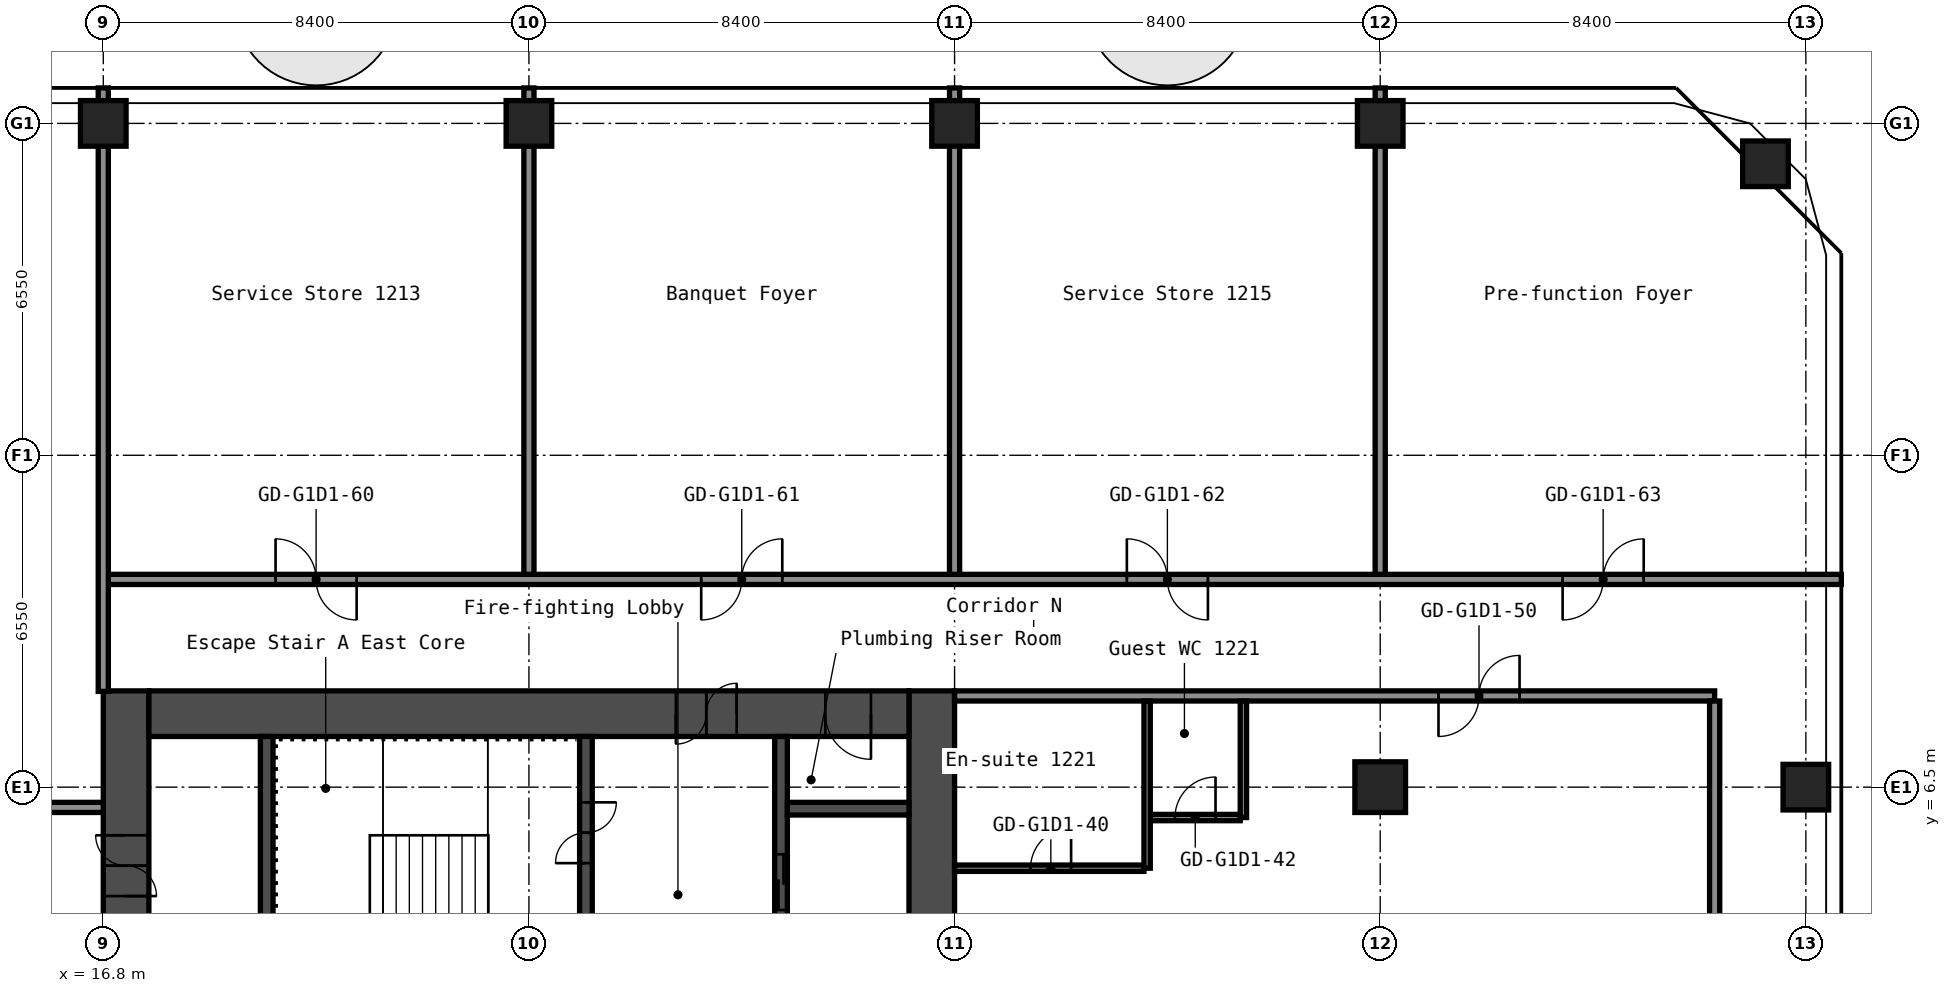
"""IFC4 building model, lengths in metres.
Left out: names, types, materials, properties, quantities, classifications, styles, units other than length and angle.
Written with IfcOpenShell. Run it as: python <this file> out.ifc"""

import sys

from ifc_helpers import new_model, si_unit, direction, frame, frame_2d, origin, origin_2d, place, context, subcontext, project, spatial, rectangle, hollow_rectangle, extrude, element, fill, save


model = new_model("IFC4")
c1 = context("Model", 3, precision=1e-05, world=origin(), true_north=direction((0.0, 1.0)))
c2 = subcontext(c1, "Body", "Model", "MODEL_VIEW")
j1 = project(units=[si_unit("LENGTHUNIT", "METRE"), si_unit("PLANEANGLEUNIT", "RADIAN")], contexts=[c1])
p1 = place(None, origin())
s1 = spatial("IfcSite", under=j1, at=p1, CompositionType="ELEMENT")
p2 = place(p1, origin())
s2 = spatial("IfcBuilding", under=s1, at=p2, CompositionType="ELEMENT")
p3 = place(p2, frame((0.0, 0.0, 45.4)))
s3 = spatial("IfcBuildingStorey", under=s2, at=p3, CompositionType="ELEMENT", Elevation=45.4)
for number, where, z_axis, x_axis in (
    (1, (16.8, 19.6, 0.0), (0.0, 0.0, 1.0), (1.0, 0.0, 0.0)),
    (2, (25.2, 19.6, 0.0), (0.0, 0.0, 1.0), (1.0, 0.0, 0.0)),
    (3, (33.6, 19.6, 0.0), (0.0, 0.0, 1.0), (1.0, 0.0, 0.0)),
):
    element("IfcColumn", number, at=place(p3, frame(where, z_axis=z_axis, x_axis=x_axis)), inside=s3, PredefinedType="COLUMN", context=c2, shape_type="SweptSolid", body=[
        extrude(hollow_rectangle(XDim=0.9, YDim=0.9, WallThickness=0.036, at=origin_2d()), origin(), (0.0, 0.0, 1.0), 2.8),
    ])
p4 = place(p3, frame((42.0, 6.5, 0.0), z_axis=(0.0, 0.0, 1.0), x_axis=(1.0, 0.0, 0.0)))
e4 = element("IfcColumn", 4, at=p4, inside=s3, PredefinedType="COLUMN", context=c2, shape_type="SweptSolid", body=[
    extrude(hollow_rectangle(XDim=1.0, YDim=1.0, WallThickness=0.04, at=origin_2d()), origin(), (0.0, 0.0, 1.0), 2.8),
])
for number, where, z_axis, x_axis in (
    (5, (42.0, 19.6, 0.0), (0.0, 0.0, 1.0), (1.0, 0.0, 0.0)),
    (6, (50.4, 6.5, 0.0), (0.0, 0.0, 1.0), (1.0, 0.0, 0.0)),
    (7, (49.603, 18.803, 0.0), (0.0, 0.0, 1.0), (1.0, 0.0, 0.0)),
):
    element("IfcColumn", number, at=place(p3, frame(where, z_axis=z_axis, x_axis=x_axis)), inside=s3, PredefinedType="COLUMN", context=c2, shape_type="SweptSolid", body=[
        extrude(hollow_rectangle(XDim=0.9, YDim=0.9, WallThickness=0.036, at=origin_2d()), origin(), (0.0, 0.0, 1.0), 2.8),
    ])
p5 = place(p3, frame((17.25, -8.4, 0.0), z_axis=(0.0, 0.0, 1.0), x_axis=(0.0, 1.0, 0.0)))
e8 = element("IfcWall", 8, at=p5, inside=s3, PredefinedType="SHEAR", context=c2, shape_type="SweptSolid", body=[
    extrude(rectangle(XDim=16.8, YDim=0.9, at=frame_2d((8.4, 0.0))), origin(), (0.0, 0.0, 1.0), 2.8),
])
p6 = place(p5, frame((12.75, 0.0, 0.0)))
e9 = element("IfcOpeningElement", 9, at=p6, cuts=e8, PredefinedType="OPENING", context=c2, shape_type="SweptSolid", body=[
    extrude(rectangle(XDim=1.2, YDim=2.1, at=frame_2d((0.6, 1.05))), frame((0.0, 0.46, 0.0), z_axis=(0.0, -1.0, 0.0), x_axis=(1.0, 0.0, 0.0)), (0.0, 0.0, 1.0), 0.92),
])
p7 = place(p5, frame((2.85, 0.0, 0.0)))
e10 = element("IfcOpeningElement", 10, at=p7, cuts=e8, PredefinedType="OPENING", context=c2, shape_type="SweptSolid", body=[
    extrude(rectangle(XDim=1.2, YDim=2.1, at=frame_2d((0.6, 1.05))), frame((0.0, 0.46, 0.0), z_axis=(0.0, -1.0, 0.0), x_axis=(1.0, 0.0, 0.0)), (0.0, 0.0, 1.0), 0.92),
])
p8 = place(p3, frame((33.15, -8.4, 0.0), z_axis=(0.0, 0.0, 1.0), x_axis=(0.0, 1.0, 0.0)))
e11 = element("IfcWall", 11, at=p8, inside=s3, PredefinedType="SHEAR", context=c2, shape_type="SweptSolid", body=[
    extrude(rectangle(XDim=16.8, YDim=0.9, at=frame_2d((8.4, 0.0))), origin(), (0.0, 0.0, 1.0), 2.8),
])
p9 = place(p3, frame((17.7, 7.95, 0.0), z_axis=(0.0, 0.0, 1.0), x_axis=(1.0, 0.0, 0.0)))
e12 = element("IfcWall", 12, at=p9, inside=s3, PredefinedType="SHEAR", context=c2, shape_type="SweptSolid", body=[
    extrude(rectangle(XDim=15.0, YDim=0.9, at=frame_2d((7.5, 0.0))), origin(), (0.0, 0.0, 1.0), 2.8),
])
p10 = place(p9, frame((10.4, 0.0, 0.0)))
e13 = element("IfcOpeningElement", 13, at=p10, cuts=e12, PredefinedType="OPENING", context=c2, shape_type="SweptSolid", body=[
    extrude(rectangle(XDim=1.2, YDim=2.1, at=frame_2d((0.6, 1.05))), frame((0.0, 0.46, 0.0), z_axis=(0.0, -1.0, 0.0), x_axis=(1.0, 0.0, 0.0)), (0.0, 0.0, 1.0), 0.92),
])
p11 = place(p9, frame((13.35, 0.0, 0.0)))
e14 = element("IfcOpeningElement", 14, at=p11, cuts=e12, PredefinedType="OPENING", context=c2, shape_type="SweptSolid", body=[
    extrude(rectangle(XDim=0.9, YDim=2.1, at=frame_2d((0.45, 1.05))), frame((0.0, 0.46, 0.0), z_axis=(0.0, -1.0, 0.0), x_axis=(1.0, 0.0, 0.0)), (0.0, 0.0, 1.0), 0.92),
])
p12 = place(p3, frame((20.025, 1.2, 0.0), z_axis=(0.0, 0.0, 1.0), x_axis=(0.0, 1.0, 0.0)))
e15 = element("IfcWall", 15, at=p12, inside=s3, PredefinedType="SHEAR", context=c2, shape_type="SweptSolid", body=[
    extrude(rectangle(XDim=6.3, YDim=0.25, at=frame_2d((3.15, 0.0))), origin(), (0.0, 0.0, 1.0), 2.8),
])
p13 = place(p3, frame((26.325, 3.75, 0.0), z_axis=(0.0, 0.0, 1.0), x_axis=(0.0, 1.0, 0.0)))
e16 = element("IfcWall", 16, at=p13, inside=s3, PredefinedType="SHEAR", context=c2, shape_type="SweptSolid", body=[
    extrude(rectangle(XDim=3.75, YDim=0.25, at=frame_2d((1.875, 0.0))), origin(), (0.0, 0.0, 1.0), 2.8),
])
p14 = place(p13, frame((1.25, 0.0, 0.0)))
e17 = element("IfcOpeningElement", 17, at=p14, cuts=e16, PredefinedType="OPENING", context=c2, shape_type="SweptSolid", body=[
    extrude(rectangle(XDim=1.2, YDim=2.1, at=frame_2d((0.6, 1.05))), frame((0.0, 0.135, 0.0), z_axis=(0.0, -1.0, 0.0), x_axis=(1.0, 0.0, 0.0)), (0.0, 0.0, 1.0), 0.27),
])
p15 = place(p3, frame((30.175, 1.45, 0.0), z_axis=(0.0, 0.0, 1.0), x_axis=(0.0, 1.0, 0.0)))
e18 = element("IfcWall", 18, at=p15, inside=s3, PredefinedType="SHEAR", context=c2, shape_type="SweptSolid", body=[
    extrude(rectangle(XDim=6.05, YDim=0.25, at=frame_2d((3.025, 0.0))), origin(), (0.0, 0.0, 1.0), 2.8),
])
p16 = place(p15, frame((2.625, 0.0, 0.0)))
e19 = element("IfcOpeningElement", 19, at=p16, cuts=e18, PredefinedType="OPENING", context=c2, shape_type="SweptSolid", body=[
    extrude(rectangle(XDim=1.1, YDim=2.1, at=frame_2d((0.55, 1.05))), frame((0.0, 0.135, 0.0), z_axis=(0.0, -1.0, 0.0), x_axis=(1.0, 0.0, 0.0)), (0.0, 0.0, 1.0), 0.27),
])
p17 = place(p3, frame((30.3, 6.075, 0.0), z_axis=(0.0, 0.0, 1.0), x_axis=(1.0, 0.0, 0.0)))
e20 = element("IfcWall", 20, at=p17, inside=s3, PredefinedType="SHEAR", context=c2, shape_type="SweptSolid", body=[
    extrude(rectangle(XDim=2.4, YDim=0.25, at=frame_2d((1.2, 0.0))), origin(), (0.0, 0.0, 1.0), 2.8),
])
p18 = place(p3, frame((33.6, 4.9, 0.0), z_axis=(0.0, 0.0, 1.0), x_axis=(1.0, 0.0, 0.0)))
e21 = element("IfcWall", 21, at=p18, inside=s3, PredefinedType="PARTITIONING", context=c2, shape_type="SweptSolid", body=[
    extrude(rectangle(XDim=3.737, YDim=0.125, at=frame_2d((1.869, 0.0))), origin(), (0.0, 0.0, 1.0), 2.8),
])
p19 = place(p18, frame((1.5, 0.0, 0.0)))
e22 = element("IfcOpeningElement", 22, at=p19, cuts=e21, PredefinedType="OPENING", context=c2, shape_type="SweptSolid", body=[
    extrude(rectangle(XDim=0.8, YDim=2.1, at=frame_2d((0.4, 1.05))), frame((0.0, 0.073, 0.0), z_axis=(0.0, -1.0, 0.0), x_axis=(1.0, 0.0, 0.0)), (0.0, 0.0, 1.0), 0.145),
])
p20 = place(p3, frame((37.462, 5.9, 0.0), z_axis=(0.0, 0.0, 1.0), x_axis=(1.0, 0.0, 0.0)))
e23 = element("IfcWall", 23, at=p20, inside=s3, PredefinedType="PARTITIONING", context=c2, shape_type="SweptSolid", body=[
    extrude(rectangle(XDim=1.775, YDim=0.125, at=frame_2d((0.888, 0.0))), origin(), (0.0, 0.0, 1.0), 2.8),
])
p21 = place(p20, frame((0.488, 0.0, 0.0)))
e24 = element("IfcOpeningElement", 24, at=p21, cuts=e23, PredefinedType="OPENING", context=c2, shape_type="SweptSolid", body=[
    extrude(rectangle(XDim=0.8, YDim=2.1, at=frame_2d((0.4, 1.05))), frame((0.0, 0.073, 0.0), z_axis=(0.0, -1.0, 0.0), x_axis=(1.0, 0.0, 0.0)), (0.0, 0.0, 1.0), 0.145),
])
p22 = place(p3, frame((-16.8, 6.1, 0.0), z_axis=(0.0, 0.0, 1.0), x_axis=(1.0, 0.0, 0.0)))
e25 = element("IfcWall", 25, at=p22, inside=s3, PredefinedType="PARTITIONING", context=c2, shape_type="SweptSolid", body=[
    extrude(rectangle(XDim=33.6, YDim=0.2, at=frame_2d((16.8, 0.0))), origin(), (0.0, 0.0, 1.0), 2.8),
])
p23 = place(p22, frame((2.85, 0.0, 0.0)))
e26 = element("IfcOpeningElement", 26, at=p23, cuts=e25, PredefinedType="OPENING", context=c2, shape_type="SweptSolid", body=[
    extrude(rectangle(XDim=1.0, YDim=2.1, at=frame_2d((0.5, 1.05))), frame((0.0, 0.11, 0.0), z_axis=(0.0, -1.0, 0.0), x_axis=(1.0, 0.0, 0.0)), (0.0, 0.0, 1.0), 0.22),
])
p24 = place(p22, frame((4.55, 0.0, 0.0)))
e27 = element("IfcOpeningElement", 27, at=p24, cuts=e25, PredefinedType="OPENING", context=c2, shape_type="SweptSolid", body=[
    extrude(rectangle(XDim=1.0, YDim=2.1, at=frame_2d((0.5, 1.05))), frame((0.0, 0.11, 0.0), z_axis=(0.0, -1.0, 0.0), x_axis=(1.0, 0.0, 0.0)), (0.0, 0.0, 1.0), 0.22),
])
p25 = place(p22, frame((13.8, 0.0, 0.0)))
e28 = element("IfcOpeningElement", 28, at=p25, cuts=e25, PredefinedType="OPENING", context=c2, shape_type="SweptSolid", body=[
    extrude(rectangle(XDim=1.0, YDim=2.1, at=frame_2d((0.5, 1.05))), frame((0.0, 0.11, 0.0), z_axis=(0.0, -1.0, 0.0), x_axis=(1.0, 0.0, 0.0)), (0.0, 0.0, 1.0), 0.22),
])
p26 = place(p22, frame((18.7, 0.0, 0.0)))
e29 = element("IfcOpeningElement", 29, at=p26, cuts=e25, PredefinedType="OPENING", context=c2, shape_type="SweptSolid", body=[
    extrude(rectangle(XDim=1.0, YDim=2.1, at=frame_2d((0.5, 1.05))), frame((0.0, 0.11, 0.0), z_axis=(0.0, -1.0, 0.0), x_axis=(1.0, 0.0, 0.0)), (0.0, 0.0, 1.0), 0.22),
])
p27 = place(p22, frame((30.6, 0.0, 0.0)))
e30 = element("IfcOpeningElement", 30, at=p27, cuts=e25, PredefinedType="OPENING", context=c2, shape_type="SweptSolid", body=[
    extrude(rectangle(XDim=1.0, YDim=2.1, at=frame_2d((0.5, 1.05))), frame((0.0, 0.11, 0.0), z_axis=(0.0, -1.0, 0.0), x_axis=(1.0, 0.0, 0.0)), (0.0, 0.0, 1.0), 0.22),
])
p28 = place(p3, frame((33.6, 8.3, 0.0), z_axis=(0.0, 0.0, 1.0), x_axis=(1.0, 0.0, 0.0)))
e31 = element("IfcWall", 31, at=p28, inside=s3, PredefinedType="PARTITIONING", context=c2, shape_type="SweptSolid", body=[
    extrude(rectangle(XDim=15.0, YDim=0.2, at=frame_2d((7.5, 0.0))), origin(), (0.0, 0.0, 1.0), 2.8),
])
p29 = place(p28, frame((9.55, 0.0, 0.0)))
e32 = element("IfcOpeningElement", 32, at=p29, cuts=e31, PredefinedType="OPENING", context=c2, shape_type="SweptSolid", body=[
    extrude(rectangle(XDim=1.6, YDim=2.1, at=frame_2d((0.8, 1.05))), frame((0.0, 0.11, 0.0), z_axis=(0.0, -1.0, 0.0), x_axis=(1.0, 0.0, 0.0)), (0.0, 0.0, 1.0), 0.22),
])
p30 = place(p3, frame((16.8, 10.6, 0.0), z_axis=(0.0, 0.0, 1.0), x_axis=(1.0, 0.0, 0.0)))
e33 = element("IfcWall", 33, at=p30, inside=s3, PredefinedType="PARTITIONING", context=c2, shape_type="SweptSolid", body=[
    extrude(rectangle(XDim=34.3, YDim=0.2, at=frame_2d((17.15, 0.0))), origin(), (0.0, 0.0, 1.0), 2.8),
])
p31 = place(p30, frame((3.4, 0.0, 0.0)))
e34 = element("IfcOpeningElement", 34, at=p31, cuts=e33, PredefinedType="OPENING", context=c2, shape_type="SweptSolid", body=[
    extrude(rectangle(XDim=1.6, YDim=2.1, at=frame_2d((0.8, 1.05))), frame((0.0, 0.11, 0.0), z_axis=(0.0, -1.0, 0.0), x_axis=(1.0, 0.0, 0.0)), (0.0, 0.0, 1.0), 0.22),
])
p32 = place(p30, frame((11.8, 0.0, 0.0)))
e35 = element("IfcOpeningElement", 35, at=p32, cuts=e33, PredefinedType="OPENING", context=c2, shape_type="SweptSolid", body=[
    extrude(rectangle(XDim=1.6, YDim=2.1, at=frame_2d((0.8, 1.05))), frame((0.0, 0.11, 0.0), z_axis=(0.0, -1.0, 0.0), x_axis=(1.0, 0.0, 0.0)), (0.0, 0.0, 1.0), 0.22),
])
p33 = place(p30, frame((20.2, 0.0, 0.0)))
e36 = element("IfcOpeningElement", 36, at=p33, cuts=e33, PredefinedType="OPENING", context=c2, shape_type="SweptSolid", body=[
    extrude(rectangle(XDim=1.6, YDim=2.1, at=frame_2d((0.8, 1.05))), frame((0.0, 0.11, 0.0), z_axis=(0.0, -1.0, 0.0), x_axis=(1.0, 0.0, 0.0)), (0.0, 0.0, 1.0), 0.22),
])
p34 = place(p30, frame((28.8, 0.0, 0.0)))
e37 = element("IfcOpeningElement", 37, at=p34, cuts=e33, PredefinedType="OPENING", context=c2, shape_type="SweptSolid", body=[
    extrude(rectangle(XDim=1.6, YDim=2.1, at=frame_2d((0.8, 1.05))), frame((0.0, 0.11, 0.0), z_axis=(0.0, -1.0, 0.0), x_axis=(1.0, 0.0, 0.0)), (0.0, 0.0, 1.0), 0.22),
])
p35 = place(p3, frame((16.8, 8.39, 0.0), z_axis=(0.0, 0.0, 1.0), x_axis=(0.0, 1.0, 0.0)))
e38 = element("IfcWall", 38, at=p35, inside=s3, PredefinedType="PARTITIONING", context=c2, shape_type="SweptSolid", body=[
    extrude(rectangle(XDim=11.91, YDim=0.2, at=frame_2d((5.955, 0.0))), origin(), (0.0, 0.0, 1.0), 2.8),
])
for number, where, z_axis, x_axis in (
    (39, (25.2, 10.7, 0.0), (0.0, 0.0, 1.0), (0.0, 1.0, 0.0)),
    (40, (33.6, 10.7, 0.0), (0.0, 0.0, 1.0), (0.0, 1.0, 0.0)),
):
    element("IfcWall", number, at=place(p3, frame(where, z_axis=z_axis, x_axis=x_axis)), inside=s3, PredefinedType="PARTITIONING", context=c2, shape_type="SweptSolid", body=[
        extrude(rectangle(XDim=9.6, YDim=0.2, at=frame_2d((4.8, 0.0))), origin(), (0.0, 0.0, 1.0), 2.8),
    ])
p36 = place(p3, frame((37.4, 4.9, 0.0), z_axis=(0.0, 0.0, 1.0), x_axis=(0.0, 1.0, 0.0)))
e41 = element("IfcWall", 41, at=p36, inside=s3, PredefinedType="PARTITIONING", context=c2, shape_type="SweptSolid", body=[
    extrude(rectangle(XDim=3.3, YDim=0.125, at=frame_2d((1.65, 0.0))), origin(), (0.0, 0.0, 1.0), 2.8),
])
p37 = place(p3, frame((39.3, 5.9, 0.0), z_axis=(0.0, 0.0, 1.0), x_axis=(0.0, 1.0, 0.0)))
e42 = element("IfcWall", 42, at=p37, inside=s3, PredefinedType="PARTITIONING", context=c2, shape_type="SweptSolid", body=[
    extrude(rectangle(XDim=2.3, YDim=0.125, at=frame_2d((1.15, 0.0))), origin(), (0.0, 0.0, 1.0), 2.8),
])
p38 = place(p3, frame((42.0, 10.7, 0.0), z_axis=(0.0, 0.0, 1.0), x_axis=(0.0, 1.0, 0.0)))
e43 = element("IfcWall", 43, at=p38, inside=s3, PredefinedType="PARTITIONING", context=c2, shape_type="SweptSolid", body=[
    extrude(rectangle(XDim=9.6, YDim=0.2, at=frame_2d((4.8, 0.0))), origin(), (0.0, 0.0, 1.0), 2.8),
])
p39 = place(p3, frame((48.6, -8.2, 0.0), z_axis=(0.0, 0.0, 1.0), x_axis=(0.0, 1.0, 0.0)))
e44 = element("IfcWall", 44, at=p39, inside=s3, PredefinedType="PARTITIONING", context=c2, shape_type="SweptSolid", body=[
    extrude(rectangle(XDim=16.4, YDim=0.2, at=frame_2d((8.2, 0.0))), origin(), (0.0, 0.0, 1.0), 2.8),
])
p40 = place(p6, origin())
e45 = element("IfcDoor", 45, at=p40, inside=s3, OperationType="DOUBLE_DOOR_SINGLE_SWING", PredefinedType="DOOR", context=c2, shape_type="SweptSolid", body=[
    extrude(rectangle(XDim=1.2, YDim=2.1, at=frame_2d((0.6, 1.05))), frame((0.0, 0.025, 0.0), z_axis=(0.0, -1.0, 0.0), x_axis=(1.0, 0.0, 0.0)), (0.0, 0.0, 1.0), 0.05),
])
fill(e9, e45)
p41 = place(p10, origin())
e46 = element("IfcDoor", 46, at=p41, inside=s3, OperationType="DOUBLE_DOOR_SINGLE_SWING", PredefinedType="DOOR", context=c2, shape_type="SweptSolid", body=[
    extrude(rectangle(XDim=1.2, YDim=2.1, at=frame_2d((0.6, 1.05))), frame((0.0, 0.025, 0.0), z_axis=(0.0, -1.0, 0.0), x_axis=(1.0, 0.0, 0.0)), (0.0, 0.0, 1.0), 0.05),
])
fill(e13, e46)
p42 = place(p11, origin())
e47 = element("IfcDoor", 47, at=p42, inside=s3, OperationType="SINGLE_SWING_RIGHT", PredefinedType="DOOR", context=c2, shape_type="SweptSolid", body=[
    extrude(rectangle(XDim=0.9, YDim=2.1, at=frame_2d((0.45, 1.05))), frame((0.0, 0.025, 0.0), z_axis=(0.0, -1.0, 0.0), x_axis=(1.0, 0.0, 0.0)), (0.0, 0.0, 1.0), 0.05),
])
fill(e14, e47)
p43 = place(p14, origin())
e48 = element("IfcDoor", 48, at=p43, inside=s3, OperationType="DOUBLE_DOOR_SINGLE_SWING", PredefinedType="DOOR", context=c2, shape_type="SweptSolid", body=[
    extrude(rectangle(XDim=1.2, YDim=2.1, at=frame_2d((0.6, 1.05))), frame((0.0, 0.025, 0.0), z_axis=(0.0, -1.0, 0.0), x_axis=(1.0, 0.0, 0.0)), (0.0, 0.0, 1.0), 0.05),
])
fill(e17, e48)
p44 = place(p16, origin())
e49 = element("IfcDoor", 49, at=p44, inside=s3, OperationType="DOUBLE_DOOR_SLIDING", PredefinedType="DOOR", context=c2, shape_type="SweptSolid", body=[
    extrude(rectangle(XDim=1.1, YDim=2.1, at=frame_2d((0.55, 1.05))), frame((0.0, 0.025, 0.0), z_axis=(0.0, -1.0, 0.0), x_axis=(1.0, 0.0, 0.0)), (0.0, 0.0, 1.0), 0.05),
])
fill(e19, e49)
p45 = place(p19, origin())
e50 = element("IfcDoor", 50, at=p45, inside=s3, OperationType="SINGLE_SWING_LEFT", PredefinedType="DOOR", context=c2, shape_type="SweptSolid", body=[
    extrude(rectangle(XDim=0.8, YDim=2.1, at=frame_2d((0.4, 1.05))), frame((0.0, 0.025, 0.0), z_axis=(0.0, -1.0, 0.0), x_axis=(1.0, 0.0, 0.0)), (0.0, 0.0, 1.0), 0.05),
])
fill(e22, e50)
p46 = place(p21, origin())
e51 = element("IfcDoor", 51, at=p46, inside=s3, OperationType="SINGLE_SWING_LEFT", PredefinedType="DOOR", context=c2, shape_type="SweptSolid", body=[
    extrude(rectangle(XDim=0.8, YDim=2.1, at=frame_2d((0.4, 1.05))), frame((0.0, 0.025, 0.0), z_axis=(0.0, -1.0, 0.0), x_axis=(1.0, 0.0, 0.0)), (0.0, 0.0, 1.0), 0.05),
])
fill(e24, e51)
p47 = place(p29, origin())
e52 = element("IfcDoor", 52, at=p47, inside=s3, OperationType="DOUBLE_DOOR_SINGLE_SWING", PredefinedType="DOOR", context=c2, shape_type="SweptSolid", body=[
    extrude(rectangle(XDim=1.6, YDim=2.1, at=frame_2d((0.8, 1.05))), frame((0.0, 0.025, 0.0), z_axis=(0.0, -1.0, 0.0), x_axis=(1.0, 0.0, 0.0)), (0.0, 0.0, 1.0), 0.05),
])
fill(e32, e52)
p48 = place(p31, origin())
e53 = element("IfcDoor", 53, at=p48, inside=s3, OperationType="DOUBLE_DOOR_SINGLE_SWING", PredefinedType="DOOR", context=c2, shape_type="SweptSolid", body=[
    extrude(rectangle(XDim=1.6, YDim=2.1, at=frame_2d((0.8, 1.05))), frame((0.0, 0.025, 0.0), z_axis=(0.0, -1.0, 0.0), x_axis=(1.0, 0.0, 0.0)), (0.0, 0.0, 1.0), 0.05),
])
fill(e34, e53)
p49 = place(p32, origin())
e54 = element("IfcDoor", 54, at=p49, inside=s3, OperationType="DOUBLE_DOOR_SINGLE_SWING", PredefinedType="DOOR", context=c2, shape_type="SweptSolid", body=[
    extrude(rectangle(XDim=1.6, YDim=2.1, at=frame_2d((0.8, 1.05))), frame((0.0, 0.025, 0.0), z_axis=(0.0, -1.0, 0.0), x_axis=(1.0, 0.0, 0.0)), (0.0, 0.0, 1.0), 0.05),
])
fill(e35, e54)
p50 = place(p33, origin())
e55 = element("IfcDoor", 55, at=p50, inside=s3, OperationType="DOUBLE_DOOR_SINGLE_SWING", PredefinedType="DOOR", context=c2, shape_type="SweptSolid", body=[
    extrude(rectangle(XDim=1.6, YDim=2.1, at=frame_2d((0.8, 1.05))), frame((0.0, 0.025, 0.0), z_axis=(0.0, -1.0, 0.0), x_axis=(1.0, 0.0, 0.0)), (0.0, 0.0, 1.0), 0.05),
])
fill(e36, e55)
p51 = place(p34, origin())
e56 = element("IfcDoor", 56, at=p51, inside=s3, OperationType="DOUBLE_DOOR_SINGLE_SWING", PredefinedType="DOOR", context=c2, shape_type="SweptSolid", body=[
    extrude(rectangle(XDim=1.6, YDim=2.1, at=frame_2d((0.8, 1.05))), frame((0.0, 0.025, 0.0), z_axis=(0.0, -1.0, 0.0), x_axis=(1.0, 0.0, 0.0)), (0.0, 0.0, 1.0), 0.05),
])
fill(e37, e56)
save(model, sys.argv[1])
